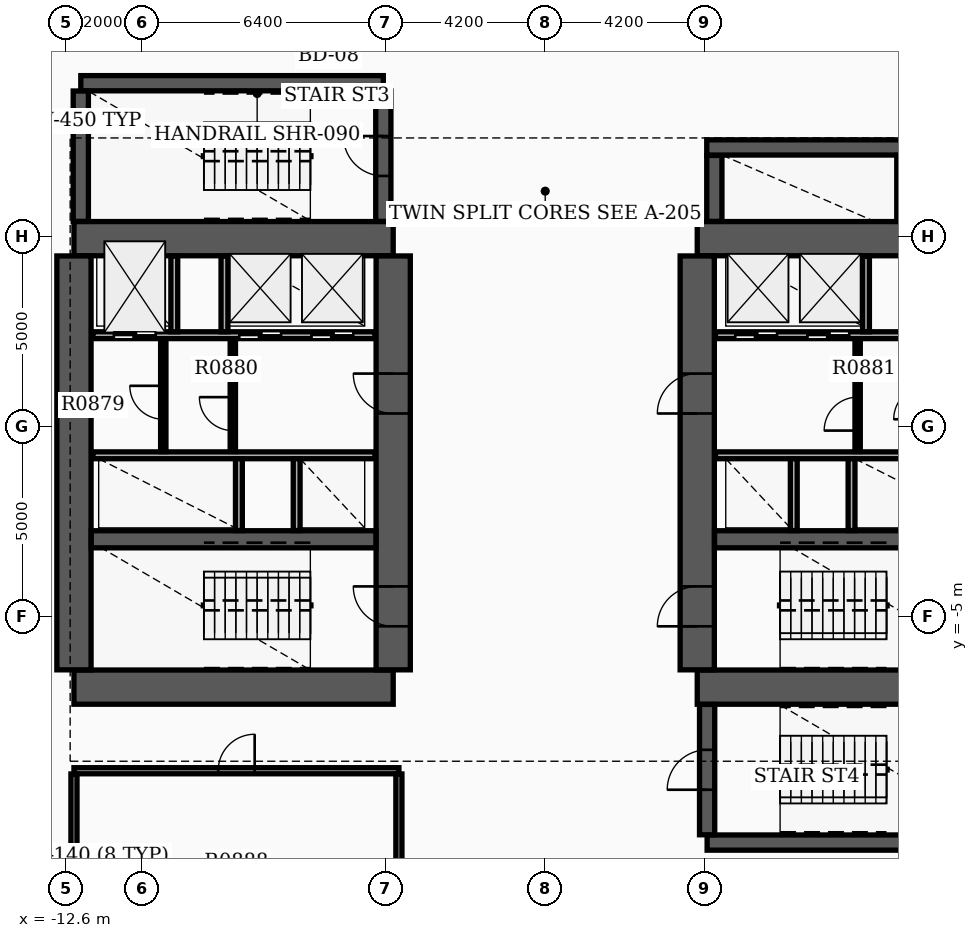
"""IFC4 building model, lengths in metres.
Left out: names, types, materials, properties, quantities, classifications, styles, units other than length and angle.
Written with IfcOpenShell. Run it as: python <this file> out.ifc"""

import sys

from ifc_helpers import new_model, si_unit, direction, frame, frame_2d, origin, place, context, subcontext, project, spatial, rectangle, extrude, element, fill, save


model = new_model("IFC4")
c1 = context("Model", 3, precision=1e-05, world=origin(), true_north=direction((0.0, 1.0)))
c2 = subcontext(c1, "Body", "Model", "MODEL_VIEW")
j1 = project(units=[si_unit("LENGTHUNIT", "METRE"), si_unit("PLANEANGLEUNIT", "RADIAN")], contexts=[c1])
p1 = place(None, origin())
s1 = spatial("IfcSite", under=j1, at=p1, CompositionType="ELEMENT")
p2 = place(p1, origin())
s2 = spatial("IfcBuilding", under=s1, at=p2, CompositionType="ELEMENT")
p3 = place(p2, frame((0.0, 0.0, 60.0)))
s3 = spatial("IfcBuildingStorey", under=s2, at=p3, CompositionType="ELEMENT", Elevation=60.0)
for number, where, z_axis, x_axis in (
    (1, (-12.4, -6.85, 0.0), (0.0, 0.0, 1.0), (1.0, 0.0, 0.0)),
    (2, (-12.4, 4.95, 0.0), (0.0, 0.0, 1.0), (1.0, 0.0, 0.0)),
):
    element("IfcWall", number, at=place(p3, frame(where, z_axis=z_axis, x_axis=x_axis)), inside=s3, PredefinedType="SHEAR", context=c2, shape_type="SweptSolid", body=[
        extrude(rectangle(XDim=8.4, YDim=0.9, at=frame_2d((4.2, 0.0))), origin(), (0.0, 0.0, 1.0), 3.7),
    ])
p4 = place(p3, frame((-12.4, -6.395, 0.0), z_axis=(0.0, 0.0, 1.0), x_axis=(0.0, 1.0, 0.0)))
e3 = element("IfcWall", 3, at=p4, inside=s3, PredefinedType="SHEAR", context=c2, shape_type="SweptSolid", body=[
    extrude(rectangle(XDim=10.89, YDim=0.9, at=frame_2d((5.445, 0.0))), origin(), (0.0, 0.0, 1.0), 3.7),
])
p5 = place(p3, frame((-4.0, -6.395, 0.0), z_axis=(0.0, 0.0, 1.0), x_axis=(0.0, 1.0, 0.0)))
e4 = element("IfcWall", 4, at=p5, inside=s3, PredefinedType="SHEAR", context=c2, shape_type="SweptSolid", body=[
    extrude(rectangle(XDim=10.89, YDim=0.9, at=frame_2d((5.445, 0.0))), origin(), (0.0, 0.0, 1.0), 3.7),
])
p6 = place(p5, frame((1.145, 0.0, 0.0)))
e5 = element("IfcOpeningElement", 5, at=p6, cuts=e4, PredefinedType="OPENING", context=c2, shape_type="SweptSolid", body=[
    extrude(rectangle(XDim=1.05, YDim=2.15, at=frame_2d((0.525, 1.075))), frame((0.0, 0.46, 0.0), z_axis=(0.0, -1.0, 0.0), x_axis=(1.0, 0.0, 0.0)), (0.0, 0.0, 1.0), 0.92),
])
p7 = place(p5, frame((6.745, 0.0, 0.0)))
e6 = element("IfcOpeningElement", 6, at=p7, cuts=e4, PredefinedType="OPENING", context=c2, shape_type="SweptSolid", body=[
    extrude(rectangle(XDim=1.05, YDim=2.15, at=frame_2d((0.525, 1.075))), frame((0.0, 0.46, 0.0), z_axis=(0.0, -1.0, 0.0), x_axis=(1.0, 0.0, 0.0)), (0.0, 0.0, 1.0), 0.92),
])
p8 = place(p3, frame((-11.945, -2.96, 0.0), z_axis=(0.0, 0.0, 1.0), x_axis=(1.0, 0.0, 0.0)))
e7 = element("IfcWall", 7, at=p8, inside=s3, PredefinedType="SHEAR", context=c2, shape_type="SweptSolid", body=[
    extrude(rectangle(XDim=7.49, YDim=0.45, at=frame_2d((3.745, 0.0))), origin(), (0.0, 0.0, 1.0), 3.7),
])
for number, where, z_axis, x_axis in (
    (8, (4.0, -6.85, 0.0), (0.0, 0.0, 1.0), (1.0, 0.0, 0.0)),
    (9, (4.0, 4.95, 0.0), (0.0, 0.0, 1.0), (1.0, 0.0, 0.0)),
):
    element("IfcWall", number, at=place(p3, frame(where, z_axis=z_axis, x_axis=x_axis)), inside=s3, PredefinedType="SHEAR", context=c2, shape_type="SweptSolid", body=[
        extrude(rectangle(XDim=8.4, YDim=0.9, at=frame_2d((4.2, 0.0))), origin(), (0.0, 0.0, 1.0), 3.7),
    ])
p9 = place(p3, frame((4.0, -6.395, 0.0), z_axis=(0.0, 0.0, 1.0), x_axis=(0.0, 1.0, 0.0)))
e10 = element("IfcWall", 10, at=p9, inside=s3, PredefinedType="SHEAR", context=c2, shape_type="SweptSolid", body=[
    extrude(rectangle(XDim=10.89, YDim=0.9, at=frame_2d((5.445, 0.0))), origin(), (0.0, 0.0, 1.0), 3.7),
])
p10 = place(p9, frame((1.145, 0.0, 0.0)))
e11 = element("IfcOpeningElement", 11, at=p10, cuts=e10, PredefinedType="OPENING", context=c2, shape_type="SweptSolid", body=[
    extrude(rectangle(XDim=1.05, YDim=2.15, at=frame_2d((0.525, 1.075))), frame((0.0, 0.46, 0.0), z_axis=(0.0, -1.0, 0.0), x_axis=(1.0, 0.0, 0.0)), (0.0, 0.0, 1.0), 0.92),
])
p11 = place(p9, frame((6.745, 0.0, 0.0)))
e12 = element("IfcOpeningElement", 12, at=p11, cuts=e10, PredefinedType="OPENING", context=c2, shape_type="SweptSolid", body=[
    extrude(rectangle(XDim=1.05, YDim=2.15, at=frame_2d((0.525, 1.075))), frame((0.0, 0.46, 0.0), z_axis=(0.0, -1.0, 0.0), x_axis=(1.0, 0.0, 0.0)), (0.0, 0.0, 1.0), 0.92),
])
p12 = place(p3, frame((4.455, -2.96, 0.0), z_axis=(0.0, 0.0, 1.0), x_axis=(1.0, 0.0, 0.0)))
e13 = element("IfcWall", 13, at=p12, inside=s3, PredefinedType="SHEAR", context=c2, shape_type="SweptSolid", body=[
    extrude(rectangle(XDim=7.49, YDim=0.45, at=frame_2d((3.745, 0.0))), origin(), (0.0, 0.0, 1.0), 3.7),
])
p13 = place(p3, frame((-12.22, 9.04, 0.0), z_axis=(0.0, 0.0, 1.0), x_axis=(1.0, 0.0, 0.0)))
e14 = element("IfcWall", 14, at=p13, inside=s3, PredefinedType="SHEAR", context=c2, shape_type="SweptSolid", body=[
    extrude(rectangle(XDim=7.96, YDim=0.4, at=frame_2d((3.98, 0.0))), origin(), (0.0, 0.0, 1.0), 3.7),
])
p14 = place(p3, frame((-12.22, 5.405, 0.0), z_axis=(0.0, 0.0, 1.0), x_axis=(0.0, 1.0, 0.0)))
e15 = element("IfcWall", 15, at=p14, inside=s3, PredefinedType="SHEAR", context=c2, shape_type="SweptSolid", body=[
    extrude(rectangle(XDim=3.43, YDim=0.4, at=frame_2d((1.715, 0.0))), origin(), (0.0, 0.0, 1.0), 3.7),
])
p15 = place(p3, frame((-4.26, 5.405, 0.0), z_axis=(0.0, 0.0, 1.0), x_axis=(0.0, 1.0, 0.0)))
e16 = element("IfcWall", 16, at=p15, inside=s3, PredefinedType="SHEAR", context=c2, shape_type="SweptSolid", body=[
    extrude(rectangle(XDim=3.43, YDim=0.4, at=frame_2d((1.715, 0.0))), origin(), (0.0, 0.0, 1.0), 3.7),
])
p16 = place(p15, frame((1.195, 0.0, 0.0)))
e17 = element("IfcOpeningElement", 17, at=p16, cuts=e16, PredefinedType="OPENING", context=c2, shape_type="SweptSolid", body=[
    extrude(rectangle(XDim=1.05, YDim=2.15, at=frame_2d((0.525, 1.075))), frame((0.0, 0.21, 0.0), z_axis=(0.0, -1.0, 0.0), x_axis=(1.0, 0.0, 0.0)), (0.0, 0.0, 1.0), 0.42),
])
p17 = place(p3, frame((4.26, -10.94, 0.0), z_axis=(0.0, 0.0, 1.0), x_axis=(1.0, 0.0, 0.0)))
e18 = element("IfcWall", 18, at=p17, inside=s3, PredefinedType="SHEAR", context=c2, shape_type="SweptSolid", body=[
    extrude(rectangle(XDim=7.96, YDim=0.4, at=frame_2d((3.98, 0.0))), origin(), (0.0, 0.0, 1.0), 3.7),
])
p18 = place(p3, frame((4.26, -10.735, 0.0), z_axis=(0.0, 0.0, 1.0), x_axis=(0.0, 1.0, 0.0)))
e19 = element("IfcWall", 19, at=p18, inside=s3, PredefinedType="SHEAR", context=c2, shape_type="SweptSolid", body=[
    extrude(rectangle(XDim=3.43, YDim=0.4, at=frame_2d((1.715, 0.0))), origin(), (0.0, 0.0, 1.0), 3.7),
])
p19 = place(p18, frame((1.185, 0.0, 0.0)))
e20 = element("IfcOpeningElement", 20, at=p19, cuts=e19, PredefinedType="OPENING", context=c2, shape_type="SweptSolid", body=[
    extrude(rectangle(XDim=1.05, YDim=2.15, at=frame_2d((0.525, 1.075))), frame((0.0, 0.21, 0.0), z_axis=(0.0, -1.0, 0.0), x_axis=(1.0, 0.0, 0.0)), (0.0, 0.0, 1.0), 0.42),
])
p20 = place(p3, frame((4.45, 5.405, 0.0), z_axis=(0.0, 0.0, 1.0), x_axis=(0.0, 1.0, 0.0)))
e21 = element("IfcWall", 21, at=p20, inside=s3, PredefinedType="SHEAR", context=c2, shape_type="SweptSolid", body=[
    extrude(rectangle(XDim=1.735, YDim=0.4, at=frame_2d((0.867, 0.0))), origin(), (0.0, 0.0, 1.0), 3.7),
])
p21 = place(p3, frame((4.25, 7.35, 0.0), z_axis=(0.0, 0.0, 1.0), x_axis=(1.0, 0.0, 0.0)))
e22 = element("IfcWall", 22, at=p21, inside=s3, PredefinedType="SHEAR", context=c2, shape_type="SweptSolid", body=[
    extrude(rectangle(XDim=5.4, YDim=0.4, at=frame_2d((2.7, 0.0))), origin(), (0.0, 0.0, 1.0), 3.7),
])
p22 = place(p3, frame((9.45, 5.405, 0.0), z_axis=(0.0, 0.0, 1.0), x_axis=(0.0, 1.0, 0.0)))
e23 = element("IfcWall", 23, at=p22, inside=s3, PredefinedType="SHEAR", context=c2, shape_type="SweptSolid", body=[
    extrude(rectangle(XDim=1.735, YDim=0.4, at=frame_2d((0.867, 0.0))), origin(), (0.0, 0.0, 1.0), 3.7),
])
p23 = place(p3, frame((-11.9, 2.41, 0.0), z_axis=(0.0, 0.0, 1.0), x_axis=(1.0, 0.0, 0.0)))
e24 = element("IfcWall", 24, at=p23, inside=s3, PredefinedType="SOLIDWALL", context=c2, shape_type="SweptSolid", body=[
    extrude(rectangle(XDim=7.42, YDim=0.18, at=frame_2d((3.71, 0.0))), origin(), (0.0, 0.0, 1.0), 2.9),
])
p24 = place(p23, frame((0.55, 0.0, 0.0)))
e25 = element("IfcOpeningElement", 25, at=p24, cuts=e24, PredefinedType="OPENING", context=c2, shape_type="SweptSolid", body=[
    extrude(rectangle(XDim=1.1, YDim=2.15, at=frame_2d((0.55, 1.075))), frame((0.0, 0.1, 0.0), z_axis=(0.0, -1.0, 0.0), x_axis=(1.0, 0.0, 0.0)), (0.0, 0.0, 1.0), 0.2),
])
p25 = place(p23, frame((3.85, 0.0, 0.0)))
e26 = element("IfcOpeningElement", 26, at=p25, cuts=e24, PredefinedType="OPENING", context=c2, shape_type="SweptSolid", body=[
    extrude(rectangle(XDim=1.1, YDim=2.15, at=frame_2d((0.55, 1.075))), frame((0.0, 0.1, 0.0), z_axis=(0.0, -1.0, 0.0), x_axis=(1.0, 0.0, 0.0)), (0.0, 0.0, 1.0), 0.2),
])
p26 = place(p23, frame((5.75, 0.0, 0.0)))
e27 = element("IfcOpeningElement", 27, at=p26, cuts=e24, PredefinedType="OPENING", context=c2, shape_type="SweptSolid", body=[
    extrude(rectangle(XDim=1.1, YDim=2.15, at=frame_2d((0.55, 1.075))), frame((0.0, 0.1, 0.0), z_axis=(0.0, -1.0, 0.0), x_axis=(1.0, 0.0, 0.0)), (0.0, 0.0, 1.0), 0.2),
])
p27 = place(p3, frame((4.48, 2.41, 0.0), z_axis=(0.0, 0.0, 1.0), x_axis=(1.0, 0.0, 0.0)))
e28 = element("IfcWall", 28, at=p27, inside=s3, PredefinedType="SOLIDWALL", context=c2, shape_type="SweptSolid", body=[
    extrude(rectangle(XDim=7.42, YDim=0.18, at=frame_2d((3.71, 0.0))), origin(), (0.0, 0.0, 1.0), 2.9),
])
p28 = place(p27, frame((5.67, 0.0, 0.0)))
e29 = element("IfcOpeningElement", 29, at=p28, cuts=e28, PredefinedType="OPENING", context=c2, shape_type="SweptSolid", body=[
    extrude(rectangle(XDim=1.1, YDim=2.15, at=frame_2d((0.55, 1.075))), frame((0.0, 0.1, 0.0), z_axis=(0.0, -1.0, 0.0), x_axis=(1.0, 0.0, 0.0)), (0.0, 0.0, 1.0), 0.2),
])
p29 = place(p27, frame((0.52, 0.0, 0.0)))
e30 = element("IfcOpeningElement", 30, at=p29, cuts=e28, PredefinedType="OPENING", context=c2, shape_type="SweptSolid", body=[
    extrude(rectangle(XDim=1.1, YDim=2.15, at=frame_2d((0.55, 1.075))), frame((0.0, 0.1, 0.0), z_axis=(0.0, -1.0, 0.0), x_axis=(1.0, 0.0, 0.0)), (0.0, 0.0, 1.0), 0.2),
])
p30 = place(p27, frame((2.42, 0.0, 0.0)))
e31 = element("IfcOpeningElement", 31, at=p30, cuts=e28, PredefinedType="OPENING", context=c2, shape_type="SweptSolid", body=[
    extrude(rectangle(XDim=1.1, YDim=2.15, at=frame_2d((0.55, 1.075))), frame((0.0, 0.1, 0.0), z_axis=(0.0, -1.0, 0.0), x_axis=(1.0, 0.0, 0.0)), (0.0, 0.0, 1.0), 0.2),
])
for number, where, z_axis, x_axis in (
    (32, (-11.9, -0.75, 0.0), (0.0, 0.0, 1.0), (1.0, 0.0, 0.0)),
    (33, (4.48, -0.75, 0.0), (0.0, 0.0, 1.0), (1.0, 0.0, 0.0)),
):
    element("IfcWall", number, at=place(p3, frame(where, z_axis=z_axis, x_axis=x_axis)), inside=s3, PredefinedType="SOLIDWALL", context=c2, shape_type="SweptSolid", body=[
        extrude(rectangle(XDim=7.42, YDim=0.18, at=frame_2d((3.71, 0.0))), origin(), (0.0, 0.0, 1.0), 2.9),
    ])
for number, where, z_axis, x_axis in (
    (34, (-9.76, 2.5, 0.0), (0.0, 0.0, 1.0), (0.0, 1.0, 0.0)),
    (35, (-8.44, 2.5, 0.0), (0.0, 0.0, 1.0), (0.0, 1.0, 0.0)),
    (36, (8.44, 2.5, 0.0), (0.0, 0.0, 1.0), (0.0, 1.0, 0.0)),
):
    element("IfcWall", number, at=place(p3, frame(where, z_axis=z_axis, x_axis=x_axis)), inside=s3, PredefinedType="SOLIDWALL", context=c2, shape_type="SweptSolid", body=[
        extrude(rectangle(XDim=1.99, YDim=0.18, at=frame_2d((0.995, 0.0))), origin(), (0.0, 0.0, 1.0), 2.9),
    ])
for number, where, z_axis, x_axis in (
    (37, (-8.06, -2.73, 0.0), (0.0, 0.0, 1.0), (0.0, 1.0, 0.0)),
    (38, (-6.54, -2.73, 0.0), (0.0, 0.0, 1.0), (0.0, 1.0, 0.0)),
    (39, (6.54, -2.73, 0.0), (0.0, 0.0, 1.0), (0.0, 1.0, 0.0)),
    (40, (8.06, -2.73, 0.0), (0.0, 0.0, 1.0), (0.0, 1.0, 0.0)),
):
    element("IfcWall", number, at=place(p3, frame(where, z_axis=z_axis, x_axis=x_axis)), inside=s3, PredefinedType="SOLIDWALL", context=c2, shape_type="SweptSolid", body=[
        extrude(rectangle(XDim=1.89, YDim=0.18, at=frame_2d((0.945, 0.0))), origin(), (0.0, 0.0, 1.0), 2.9),
    ])
p31 = place(p3, frame((-8.22, -0.65, 0.0), z_axis=(0.0, 0.0, 1.0), x_axis=(0.0, 1.0, 0.0)))
e41 = element("IfcWall", 41, at=p31, inside=s3, PredefinedType="SOLIDWALL", context=c2, shape_type="SweptSolid", body=[
    extrude(rectangle(XDim=2.96, YDim=0.14, at=frame_2d((1.48, 0.0))), origin(), (0.0, 0.0, 1.0), 2.9),
])
p32 = place(p31, frame((0.55, 0.0, 0.0)))
e42 = element("IfcOpeningElement", 42, at=p32, cuts=e41, PredefinedType="OPENING", context=c2, shape_type="SweptSolid", body=[
    extrude(rectangle(XDim=0.88, YDim=2.1, at=frame_2d((0.44, 1.05))), frame((0.0, 0.08, 0.0), z_axis=(0.0, -1.0, 0.0), x_axis=(1.0, 0.0, 0.0)), (0.0, 0.0, 1.0), 0.16),
])
p33 = place(p3, frame((8.22, -0.65, 0.0), z_axis=(0.0, 0.0, 1.0), x_axis=(0.0, 1.0, 0.0)))
e43 = element("IfcWall", 43, at=p33, inside=s3, PredefinedType="SOLIDWALL", context=c2, shape_type="SweptSolid", body=[
    extrude(rectangle(XDim=2.96, YDim=0.14, at=frame_2d((1.48, 0.0))), origin(), (0.0, 0.0, 1.0), 2.9),
])
p34 = place(p33, frame((0.55, 0.0, 0.0)))
e44 = element("IfcOpeningElement", 44, at=p34, cuts=e43, PredefinedType="OPENING", context=c2, shape_type="SweptSolid", body=[
    extrude(rectangle(XDim=0.88, YDim=2.1, at=frame_2d((0.44, 1.05))), frame((0.0, 0.08, 0.0), z_axis=(0.0, -1.0, 0.0), x_axis=(1.0, 0.0, 0.0)), (0.0, 0.0, 1.0), 0.16),
])
p35 = place(p3, frame((-10.05, -0.652, 0.0), z_axis=(0.0, 0.0, 1.0), x_axis=(0.0, 1.0, 0.0)))
e45 = element("IfcWall", 45, at=p35, inside=s3, PredefinedType="PARTITIONING", context=c2, shape_type="SweptSolid", body=[
    extrude(rectangle(XDim=2.962, YDim=0.14, at=frame_2d((1.481, 0.0))), origin(), (0.0, 0.0, 1.0), 2.9),
])
p36 = place(p35, frame((0.85, 0.0, 0.0)))
e46 = element("IfcOpeningElement", 46, at=p36, cuts=e45, PredefinedType="OPENING", context=c2, shape_type="SweptSolid", body=[
    extrude(rectangle(XDim=0.88, YDim=2.1, at=frame_2d((0.44, 1.05))), frame((0.0, 0.08, 0.0), z_axis=(0.0, -1.0, 0.0), x_axis=(1.0, 0.0, 0.0)), (0.0, 0.0, 1.0), 0.16),
])
p37 = place(p3, frame((-12.4, -9.05, 0.0), z_axis=(0.0, 0.0, 1.0), x_axis=(1.0, 0.0, 0.0)))
e47 = element("IfcWall", 47, at=p37, inside=s3, PredefinedType="PARTITIONING", context=c2, shape_type="SweptSolid", body=[
    extrude(rectangle(XDim=8.55, YDim=0.16, at=frame_2d((4.275, 0.0))), origin(), (0.0, 0.0, 1.0), 2.9),
])
p38 = place(p37, frame((3.795, 0.0, 0.0)))
e48 = element("IfcOpeningElement", 48, at=p38, cuts=e47, PredefinedType="OPENING", context=c2, shape_type="SweptSolid", body=[
    extrude(rectangle(XDim=0.96, YDim=2.15, at=frame_2d((0.48, 1.075))), frame((0.0, 0.09, 0.0), z_axis=(0.0, -1.0, 0.0), x_axis=(1.0, 0.0, 0.0)), (0.0, 0.0, 1.0), 0.18),
])
for number, where, z_axis, x_axis in (
    (49, (-12.4, -13.065, 0.0), (0.0, 0.0, 1.0), (0.0, 1.0, 0.0)),
    (50, (-3.85, -13.065, 0.0), (0.0, 0.0, 1.0), (0.0, 1.0, 0.0)),
):
    element("IfcWall", number, at=place(p3, frame(where, z_axis=z_axis, x_axis=x_axis)), inside=s3, PredefinedType="PARTITIONING", context=c2, shape_type="SweptSolid", body=[
        extrude(rectangle(XDim=3.93, YDim=0.16, at=frame_2d((1.965, 0.0))), origin(), (0.0, 0.0, 1.0), 2.9),
    ])
p39 = place(p6, origin())
e51 = element("IfcDoor", 51, at=p39, inside=s3, OperationType="SINGLE_SWING_RIGHT", PredefinedType="DOOR", context=c2, shape_type="SweptSolid", body=[
    extrude(rectangle(XDim=1.05, YDim=2.15, at=frame_2d((0.525, 1.075))), frame((0.0, 0.025, 0.0), z_axis=(0.0, -1.0, 0.0), x_axis=(1.0, 0.0, 0.0)), (0.0, 0.0, 1.0), 0.05),
])
fill(e5, e51)
p40 = place(p10, origin())
e52 = element("IfcDoor", 52, at=p40, inside=s3, OperationType="SINGLE_SWING_LEFT", PredefinedType="DOOR", context=c2, shape_type="SweptSolid", body=[
    extrude(rectangle(XDim=1.05, YDim=2.15, at=frame_2d((0.525, 1.075))), frame((0.0, 0.025, 0.0), z_axis=(0.0, -1.0, 0.0), x_axis=(1.0, 0.0, 0.0)), (0.0, 0.0, 1.0), 0.05),
])
fill(e11, e52)
p41 = place(p7, origin())
e53 = element("IfcDoor", 53, at=p41, inside=s3, OperationType="SINGLE_SWING_RIGHT", PredefinedType="DOOR", context=c2, shape_type="SweptSolid", body=[
    extrude(rectangle(XDim=1.05, YDim=2.15, at=frame_2d((0.525, 1.075))), frame((0.0, 0.025, 0.0), z_axis=(0.0, -1.0, 0.0), x_axis=(1.0, 0.0, 0.0)), (0.0, 0.0, 1.0), 0.05),
])
fill(e6, e53)
p42 = place(p11, origin())
e54 = element("IfcDoor", 54, at=p42, inside=s3, OperationType="SINGLE_SWING_LEFT", PredefinedType="DOOR", context=c2, shape_type="SweptSolid", body=[
    extrude(rectangle(XDim=1.05, YDim=2.15, at=frame_2d((0.525, 1.075))), frame((0.0, 0.025, 0.0), z_axis=(0.0, -1.0, 0.0), x_axis=(1.0, 0.0, 0.0)), (0.0, 0.0, 1.0), 0.05),
])
fill(e12, e54)
p43 = place(p16, origin())
e55 = element("IfcDoor", 55, at=p43, inside=s3, OperationType="SINGLE_SWING_RIGHT", PredefinedType="DOOR", context=c2, shape_type="SweptSolid", body=[
    extrude(rectangle(XDim=1.05, YDim=2.15, at=frame_2d((0.525, 1.075))), frame((0.0, 0.025, 0.0), z_axis=(0.0, -1.0, 0.0), x_axis=(1.0, 0.0, 0.0)), (0.0, 0.0, 1.0), 0.05),
])
fill(e17, e55)
p44 = place(p19, origin())
e56 = element("IfcDoor", 56, at=p44, inside=s3, OperationType="SINGLE_SWING_LEFT", PredefinedType="DOOR", context=c2, shape_type="SweptSolid", body=[
    extrude(rectangle(XDim=1.05, YDim=2.15, at=frame_2d((0.525, 1.075))), frame((0.0, 0.025, 0.0), z_axis=(0.0, -1.0, 0.0), x_axis=(1.0, 0.0, 0.0)), (0.0, 0.0, 1.0), 0.05),
])
fill(e20, e56)
p45 = place(p24, origin())
e57 = element("IfcDoor", 57, at=p45, inside=s3, OperationType="DOUBLE_DOOR_SLIDING", PredefinedType="DOOR", context=c2, shape_type="SweptSolid", body=[
    extrude(rectangle(XDim=1.1, YDim=2.15, at=frame_2d((0.55, 1.075))), frame((0.0, 0.025, 0.0), z_axis=(0.0, -1.0, 0.0), x_axis=(1.0, 0.0, 0.0)), (0.0, 0.0, 1.0), 0.05),
])
fill(e25, e57)
p46 = place(p25, origin())
e58 = element("IfcDoor", 58, at=p46, inside=s3, OperationType="DOUBLE_DOOR_SLIDING", PredefinedType="DOOR", context=c2, shape_type="SweptSolid", body=[
    extrude(rectangle(XDim=1.1, YDim=2.15, at=frame_2d((0.55, 1.075))), frame((0.0, 0.025, 0.0), z_axis=(0.0, -1.0, 0.0), x_axis=(1.0, 0.0, 0.0)), (0.0, 0.0, 1.0), 0.05),
])
fill(e26, e58)
p47 = place(p26, origin())
e59 = element("IfcDoor", 59, at=p47, inside=s3, OperationType="DOUBLE_DOOR_SLIDING", PredefinedType="DOOR", context=c2, shape_type="SweptSolid", body=[
    extrude(rectangle(XDim=1.1, YDim=2.15, at=frame_2d((0.55, 1.075))), frame((0.0, 0.025, 0.0), z_axis=(0.0, -1.0, 0.0), x_axis=(1.0, 0.0, 0.0)), (0.0, 0.0, 1.0), 0.05),
])
fill(e27, e59)
p48 = place(p29, origin())
e60 = element("IfcDoor", 60, at=p48, inside=s3, OperationType="DOUBLE_DOOR_SLIDING", PredefinedType="DOOR", context=c2, shape_type="SweptSolid", body=[
    extrude(rectangle(XDim=1.1, YDim=2.15, at=frame_2d((0.55, 1.075))), frame((0.0, 0.025, 0.0), z_axis=(0.0, -1.0, 0.0), x_axis=(1.0, 0.0, 0.0)), (0.0, 0.0, 1.0), 0.05),
])
fill(e30, e60)
p49 = place(p30, origin())
e61 = element("IfcDoor", 61, at=p49, inside=s3, OperationType="DOUBLE_DOOR_SLIDING", PredefinedType="DOOR", context=c2, shape_type="SweptSolid", body=[
    extrude(rectangle(XDim=1.1, YDim=2.15, at=frame_2d((0.55, 1.075))), frame((0.0, 0.025, 0.0), z_axis=(0.0, -1.0, 0.0), x_axis=(1.0, 0.0, 0.0)), (0.0, 0.0, 1.0), 0.05),
])
fill(e31, e61)
p50 = place(p32, origin())
e62 = element("IfcDoor", 62, at=p50, inside=s3, OperationType="SINGLE_SWING_RIGHT", PredefinedType="DOOR", context=c2, shape_type="SweptSolid", body=[
    extrude(rectangle(XDim=0.88, YDim=2.1, at=frame_2d((0.44, 1.05))), frame((0.0, 0.025, 0.0), z_axis=(0.0, -1.0, 0.0), x_axis=(1.0, 0.0, 0.0)), (0.0, 0.0, 1.0), 0.05),
])
fill(e42, e62)
p51 = place(p34, origin())
e63 = element("IfcDoor", 63, at=p51, inside=s3, OperationType="SINGLE_SWING_LEFT", PredefinedType="DOOR", context=c2, shape_type="SweptSolid", body=[
    extrude(rectangle(XDim=0.88, YDim=2.1, at=frame_2d((0.44, 1.05))), frame((0.0, 0.025, 0.0), z_axis=(0.0, -1.0, 0.0), x_axis=(1.0, 0.0, 0.0)), (0.0, 0.0, 1.0), 0.05),
])
fill(e44, e63)
p52 = place(p36, origin())
e64 = element("IfcDoor", 64, at=p52, inside=s3, OperationType="SINGLE_SWING_RIGHT", PredefinedType="DOOR", context=c2, shape_type="SweptSolid", body=[
    extrude(rectangle(XDim=0.88, YDim=2.1, at=frame_2d((0.44, 1.05))), frame((0.0, 0.025, 0.0), z_axis=(0.0, -1.0, 0.0), x_axis=(1.0, 0.0, 0.0)), (0.0, 0.0, 1.0), 0.05),
])
fill(e46, e64)
p53 = place(p38, origin())
e65 = element("IfcDoor", 65, at=p53, inside=s3, OperationType="SINGLE_SWING_RIGHT", PredefinedType="DOOR", context=c2, shape_type="SweptSolid", body=[
    extrude(rectangle(XDim=0.96, YDim=2.15, at=frame_2d((0.48, 1.075))), frame((0.0, 0.025, 0.0), z_axis=(0.0, -1.0, 0.0), x_axis=(1.0, 0.0, 0.0)), (0.0, 0.0, 1.0), 0.05),
])
fill(e48, e65)
save(model, sys.argv[1])
